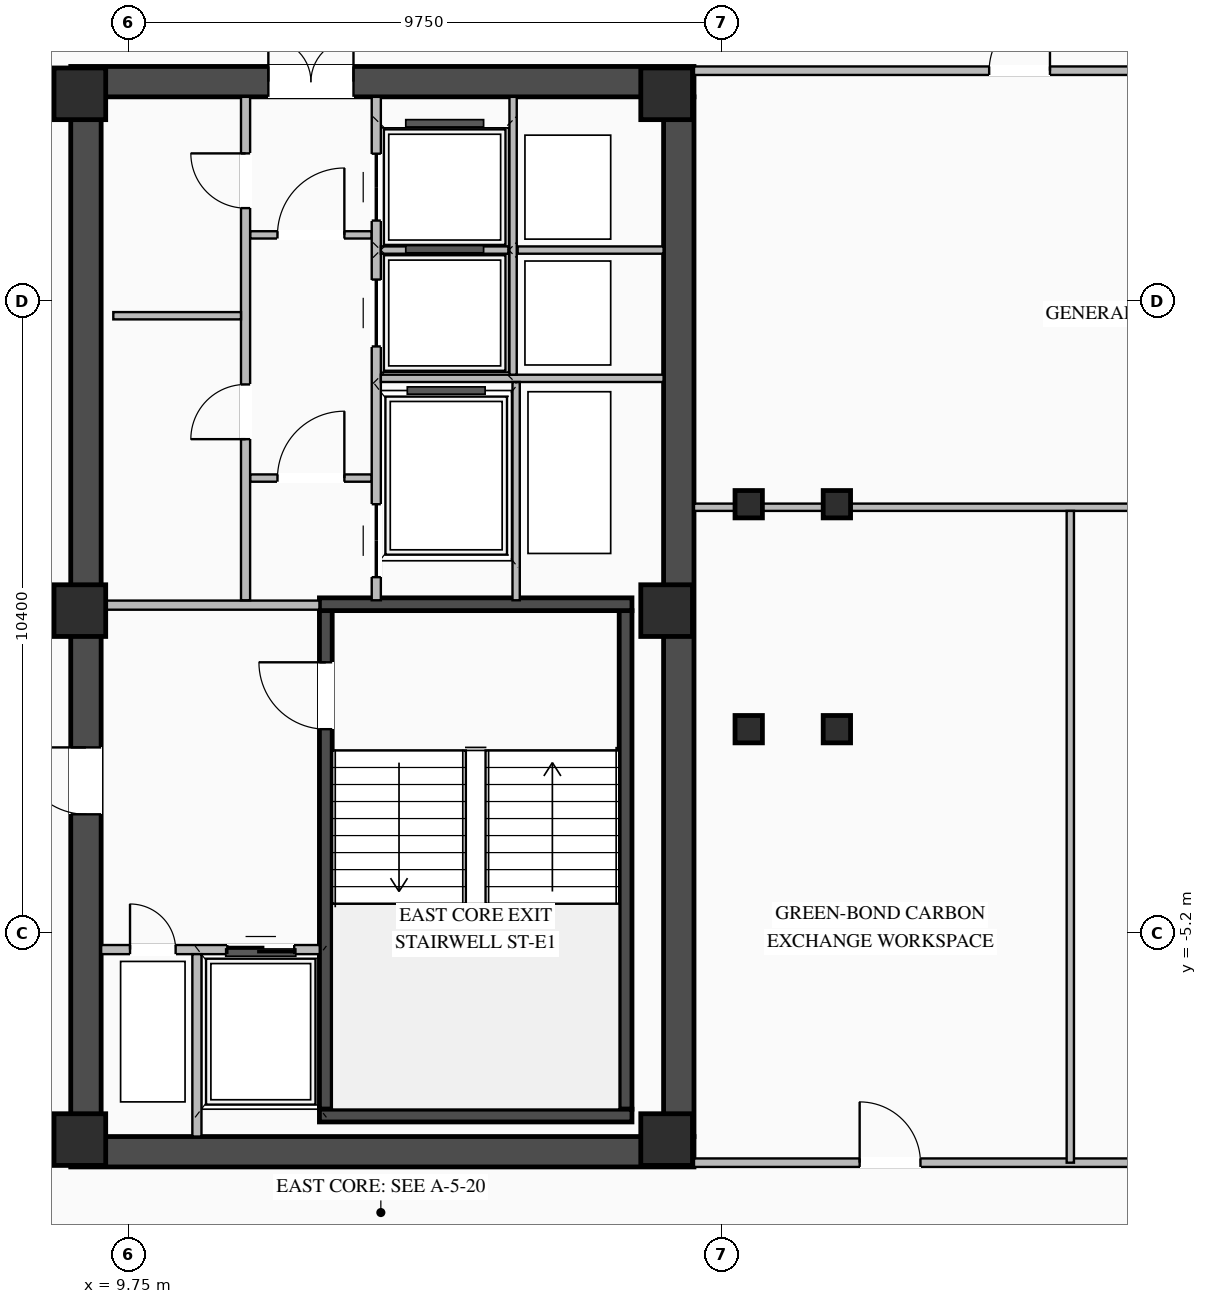
"""IFC4 building model, lengths in metres.
Left out: names, types, materials, properties, quantities, classifications, styles, units other than length and angle.
Written with IfcOpenShell. Run it as: python <this file> out.ifc"""

import sys

from ifc_helpers import new_model, si_unit, direction, frame, frame_2d, origin, origin_2d, place, context, subcontext, project, spatial, rectangle, i_section, extrude, element, fill, save


model = new_model("IFC4")
c1 = context("Model", 3, precision=1e-05, world=origin(), true_north=direction((0.0, 1.0)))
c2 = subcontext(c1, "Body", "Model", "MODEL_VIEW")
j1 = project(units=[si_unit("LENGTHUNIT", "METRE"), si_unit("PLANEANGLEUNIT", "RADIAN")], contexts=[c1])
p1 = place(None, origin())
s1 = spatial("IfcSite", under=j1, at=p1, CompositionType="ELEMENT")
p2 = place(p1, origin())
s2 = spatial("IfcBuilding", under=s1, at=p2, CompositionType="ELEMENT")
p3 = place(p2, frame((0.0, 0.0, 272.4)))
s3 = spatial("IfcBuildingStorey", under=s2, at=p3, CompositionType="ELEMENT", Elevation=272.4)
p4 = place(p3, frame((8.8, -8.8, 0.0), z_axis=(0.0, 0.0, 1.0), x_axis=(1.0, 0.0, 0.0)))
e1 = element("IfcWall", 1, at=p4, inside=s3, PredefinedType="SHEAR", context=c2, shape_type="SweptSolid", body=[
    extrude(rectangle(XDim=10.25, YDim=0.5, at=frame_2d((5.125, 0.0))), origin(), (0.0, 0.0, 1.0), 3.27),
])
p5 = place(p3, frame((8.8, 8.8, 0.0), z_axis=(0.0, 0.0, 1.0), x_axis=(1.0, 0.0, 0.0)))
e2 = element("IfcWall", 2, at=p5, inside=s3, PredefinedType="SHEAR", context=c2, shape_type="SweptSolid", body=[
    extrude(rectangle(XDim=10.25, YDim=0.5, at=frame_2d((5.125, 0.0))), origin(), (0.0, 0.0, 1.0), 3.27),
])
p6 = place(p5, frame((3.25, 0.0, 0.0)))
e3 = element("IfcOpeningElement", 3, at=p6, cuts=e2, PredefinedType="OPENING", context=c2, shape_type="SweptSolid", body=[
    extrude(rectangle(XDim=1.4, YDim=2.05, at=frame_2d((0.7, 1.025))), frame((0.0, 0.26, 0.0), z_axis=(0.0, -1.0, 0.0), x_axis=(1.0, 0.0, 0.0)), (0.0, 0.0, 1.0), 0.52),
])
p7 = place(p3, frame((9.05, -8.55, 0.0), z_axis=(0.0, 0.0, 1.0), x_axis=(0.0, 1.0, 0.0)))
e4 = element("IfcWall", 4, at=p7, inside=s3, PredefinedType="SHEAR", context=c2, shape_type="SweptSolid", body=[
    extrude(rectangle(XDim=17.1, YDim=0.5, at=frame_2d((8.55, 0.0))), origin(), (0.0, 0.0, 1.0), 3.27),
])
p8 = place(p7, frame((5.3, 0.0, 0.0)))
e5 = element("IfcOpeningElement", 5, at=p8, cuts=e4, PredefinedType="OPENING", context=c2, shape_type="SweptSolid", body=[
    extrude(rectangle(XDim=1.1, YDim=2.08, at=frame_2d((0.55, 1.04))), frame((0.0, 0.26, 0.0), z_axis=(0.0, -1.0, 0.0), x_axis=(1.0, 0.0, 0.0)), (0.0, 0.0, 1.0), 0.52),
])
p9 = place(p3, frame((18.8, -8.55, 0.0), z_axis=(0.0, 0.0, 1.0), x_axis=(0.0, 1.0, 0.0)))
e6 = element("IfcWall", 6, at=p9, inside=s3, PredefinedType="SHEAR", context=c2, shape_type="SweptSolid", body=[
    extrude(rectangle(XDim=17.1, YDim=0.5, at=frame_2d((8.55, 0.0))), origin(), (0.0, 0.0, 1.0), 3.27),
])
p10 = place(p3, frame((12.995, -8.1, 0.0), z_axis=(0.0, 0.0, 1.0), x_axis=(0.0, 1.0, 0.0)))
e7 = element("IfcWall", 7, at=p10, inside=s3, PredefinedType="SHEAR", context=c2, shape_type="SweptSolid", body=[
    extrude(rectangle(XDim=8.2, YDim=0.21, at=frame_2d((4.1, 0.0))), origin(), (0.0, 0.0, 1.0), 3.27),
])
p11 = place(p10, frame((6.25, 0.0, 0.0)))
e8 = element("IfcOpeningElement", 8, at=p11, cuts=e7, PredefinedType="OPENING", context=c2, shape_type="SweptSolid", body=[
    extrude(rectangle(XDim=1.1, YDim=2.15, at=frame_2d((0.55, 1.075))), frame((0.0, 0.115, 0.0), z_axis=(0.0, -1.0, 0.0), x_axis=(1.0, 0.0, 0.0)), (0.0, 0.0, 1.0), 0.23),
])
p12 = place(p3, frame((17.925, -8.1, 0.0), z_axis=(0.0, 0.0, 1.0), x_axis=(0.0, 1.0, 0.0)))
e9 = element("IfcWall", 9, at=p12, inside=s3, PredefinedType="SHEAR", context=c2, shape_type="SweptSolid", body=[
    extrude(rectangle(XDim=8.2, YDim=0.21, at=frame_2d((4.1, 0.0))), origin(), (0.0, 0.0, 1.0), 3.27),
])
for number, where, z_axis, x_axis in (
    (10, (12.89, -8.205, 0.0), (0.0, 0.0, 1.0), (1.0, 0.0, 0.0)),
    (11, (18.03, 0.205, 0.0), (0.0, 0.0, 1.0), (-1.0, 0.0, 0.0)),
):
    element("IfcWall", number, at=place(p3, frame(where, z_axis=z_axis, x_axis=x_axis)), inside=s3, PredefinedType="SHEAR", context=c2, shape_type="SweptSolid", body=[
        extrude(rectangle(XDim=5.14, YDim=0.21, at=frame_2d((2.57, 0.0))), origin(), (0.0, 0.0, 1.0), 3.27),
    ])
for number, where, z_axis, x_axis in (
    (12, (8.95, -8.6, 0.0), (0.0, 0.0, 1.0), (1.0, 0.0, 0.0)),
    (13, (8.95, 0.1, 0.0), (0.0, 0.0, 1.0), (1.0, 0.0, 0.0)),
    (14, (8.95, 8.6, 0.0), (0.0, 0.0, 1.0), (1.0, 0.0, 0.0)),
    (15, (18.6, -8.6, 0.0), (0.0, 0.0, 1.0), (1.0, 0.0, 0.0)),
    (16, (18.6, 0.1, 0.0), (0.0, 0.0, 1.0), (1.0, 0.0, 0.0)),
    (17, (18.6, 8.6, 0.0), (0.0, 0.0, 1.0), (1.0, 0.0, 0.0)),
):
    element("IfcColumn", number, at=place(p3, frame(where, z_axis=z_axis, x_axis=x_axis)), inside=s3, PredefinedType="COLUMN", context=c2, shape_type="SweptSolid", body=[
        extrude(rectangle(XDim=0.85, YDim=0.85, at=origin_2d()), origin(), (0.0, 0.0, 1.0), 3.45),
    ])
for number, where, z_axis, x_axis in (
    (18, (19.95, -1.85, 0.0), (0.0, 0.0, 1.0), (1.0, 0.0, 0.0)),
    (19, (19.95, 1.85, 0.0), (0.0, 0.0, 1.0), (1.0, 0.0, 0.0)),
    (20, (21.4, -1.85, 0.0), (0.0, 0.0, 1.0), (1.0, 0.0, 0.0)),
    (21, (21.4, 1.85, 0.0), (0.0, 0.0, 1.0), (1.0, 0.0, 0.0)),
):
    element("IfcColumn", number, at=place(p3, frame(where, z_axis=z_axis, x_axis=x_axis)), inside=s3, PredefinedType="COLUMN", context=c2, shape_type="SweptSolid", body=[
        extrude(i_section(OverallWidth=0.45, OverallDepth=0.45, WebThickness=0.022, FlangeThickness=0.032, at=origin_2d()), origin(), (0.0, 0.0, 1.0), 3.45),
    ])
p13 = place(p3, frame((9.3, -5.475, 0.0), z_axis=(0.0, 0.0, 1.0), x_axis=(1.0, 0.0, 0.0)))
e22 = element("IfcWall", 22, at=p13, inside=s3, PredefinedType="STANDARD", context=c2, shape_type="SweptSolid", body=[
    extrude(rectangle(XDim=3.595, YDim=0.15, at=frame_2d((1.797, 0.0))), origin(), (0.0, 0.0, 1.0), 3.25),
])
p14 = place(p13, frame((2.075, 0.0, 0.0)))
e23 = element("IfcOpeningElement", 23, at=p14, cuts=e22, PredefinedType="OPENING", context=c2, shape_type="SweptSolid", body=[
    extrude(rectangle(XDim=1.1, YDim=2.15, at=frame_2d((0.55, 1.075))), frame((0.0, 0.085, 0.0), z_axis=(0.0, -1.0, 0.0), x_axis=(1.0, 0.0, 0.0)), (0.0, 0.0, 1.0), 0.17),
])
p15 = place(p13, frame((0.475, 0.0, 0.0)))
e24 = element("IfcOpeningElement", 24, at=p15, cuts=e22, PredefinedType="OPENING", context=c2, shape_type="SweptSolid", body=[
    extrude(rectangle(XDim=0.75, YDim=2.05, at=frame_2d((0.375, 1.025))), frame((0.0, 0.085, 0.0), z_axis=(0.0, -1.0, 0.0), x_axis=(1.0, 0.0, 0.0)), (0.0, 0.0, 1.0), 0.17),
])
p16 = place(p3, frame((10.875, -8.55, 0.0), z_axis=(0.0, 0.0, 1.0), x_axis=(0.0, 1.0, 0.0)))
e25 = element("IfcWall", 25, at=p16, inside=s3, PredefinedType="STANDARD", context=c2, shape_type="SweptSolid", body=[
    extrude(rectangle(XDim=3.0, YDim=0.15, at=frame_2d((1.5, 0.0))), origin(), (0.0, 0.0, 1.0), 3.25),
])
p17 = place(p3, frame((9.3, 0.19, 0.0), z_axis=(0.0, 0.0, 1.0), x_axis=(1.0, 0.0, 0.0)))
e26 = element("IfcWall", 26, at=p17, inside=s3, PredefinedType="STANDARD", context=c2, shape_type="SweptSolid", body=[
    extrude(rectangle(XDim=3.59, YDim=0.15, at=frame_2d((1.795, 0.0))), origin(), (0.0, 0.0, 1.0), 2.645),
])
p18 = place(p3, frame((11.75, 2.28, 0.0), z_axis=(0.0, 0.0, 1.0), x_axis=(1.0, 0.0, 0.0)))
e27 = element("IfcWall", 27, at=p18, inside=s3, PredefinedType="STANDARD", context=c2, shape_type="SweptSolid", body=[
    extrude(rectangle(XDim=2.0, YDim=0.12, at=frame_2d((1.0, 0.0))), origin(), (0.0, 0.0, 1.0), 3.25),
])
p19 = place(p18, frame((0.45, 0.0, 0.0)))
e28 = element("IfcOpeningElement", 28, at=p19, cuts=e27, PredefinedType="OPENING", context=c2, shape_type="SweptSolid", body=[
    extrude(rectangle(XDim=1.1, YDim=2.1, at=frame_2d((0.55, 1.05))), frame((0.0, 0.07, 0.0), z_axis=(0.0, -1.0, 0.0), x_axis=(1.0, 0.0, 0.0)), (0.0, 0.0, 1.0), 0.14),
])
p20 = place(p3, frame((11.75, 6.28, 0.0), z_axis=(0.0, 0.0, 1.0), x_axis=(1.0, 0.0, 0.0)))
e29 = element("IfcWall", 29, at=p20, inside=s3, PredefinedType="STANDARD", context=c2, shape_type="SweptSolid", body=[
    extrude(rectangle(XDim=2.0, YDim=0.12, at=frame_2d((1.0, 0.0))), origin(), (0.0, 0.0, 1.0), 3.25),
])
p21 = place(p20, frame((0.45, 0.0, 0.0)))
e30 = element("IfcOpeningElement", 30, at=p21, cuts=e29, PredefinedType="OPENING", context=c2, shape_type="SweptSolid", body=[
    extrude(rectangle(XDim=1.1, YDim=2.1, at=frame_2d((0.55, 1.05))), frame((0.0, 0.07, 0.0), z_axis=(0.0, -1.0, 0.0), x_axis=(1.0, 0.0, 0.0)), (0.0, 0.0, 1.0), 0.14),
])
p22 = place(p3, frame((11.675, 0.27, 0.0), z_axis=(0.0, 0.0, 1.0), x_axis=(0.0, 1.0, 0.0)))
e31 = element("IfcWall", 31, at=p22, inside=s3, PredefinedType="STANDARD", context=c2, shape_type="SweptSolid", body=[
    extrude(rectangle(XDim=8.28, YDim=0.15, at=frame_2d((4.14, 0.0))), origin(), (0.0, 0.0, 1.0), 3.25),
])
p23 = place(p22, frame((2.65, 0.0, 0.0)))
e32 = element("IfcOpeningElement", 32, at=p23, cuts=e31, PredefinedType="OPENING", context=c2, shape_type="SweptSolid", body=[
    extrude(rectangle(XDim=0.9, YDim=2.05, at=frame_2d((0.45, 1.025))), frame((0.0, 0.085, 0.0), z_axis=(0.0, -1.0, 0.0), x_axis=(1.0, 0.0, 0.0)), (0.0, 0.0, 1.0), 0.17),
])
p24 = place(p22, frame((6.45, 0.0, 0.0)))
e33 = element("IfcOpeningElement", 33, at=p24, cuts=e31, PredefinedType="OPENING", context=c2, shape_type="SweptSolid", body=[
    extrude(rectangle(XDim=0.9, YDim=2.05, at=frame_2d((0.45, 1.025))), frame((0.0, 0.085, 0.0), z_axis=(0.0, -1.0, 0.0), x_axis=(1.0, 0.0, 0.0)), (0.0, 0.0, 1.0), 0.17),
])
p25 = place(p3, frame((9.5, 4.95, 0.0), z_axis=(0.0, 0.0, 1.0), x_axis=(1.0, 0.0, 0.0)))
e34 = element("IfcWall", 34, at=p25, inside=s3, PredefinedType="STANDARD", context=c2, shape_type="SweptSolid", body=[
    extrude(rectangle(XDim=2.1, YDim=0.12, at=frame_2d((1.05, 0.0))), origin(), (0.0, 0.0, 1.0), 3.25),
])
p26 = place(p3, frame((13.825, 0.27, 0.0), z_axis=(0.0, 0.0, 1.0), x_axis=(0.0, 1.0, 0.0)))
e35 = element("IfcWall", 35, at=p26, inside=s3, PredefinedType="STANDARD", context=c2, shape_type="SweptSolid", body=[
    extrude(rectangle(XDim=8.28, YDim=0.15, at=frame_2d((4.14, 0.0))), origin(), (0.0, 0.0, 1.0), 3.25),
])
p27 = place(p26, frame((4.175, 0.0, 0.0)))
e36 = element("IfcOpeningElement", 36, at=p27, cuts=e35, PredefinedType="OPENING", context=c2, shape_type="SweptSolid", body=[
    extrude(rectangle(XDim=1.1, YDim=2.1, at=frame_2d((0.55, 1.05))), frame((0.0, 0.085, 0.0), z_axis=(0.0, -1.0, 0.0), x_axis=(1.0, 0.0, 0.0)), (0.0, 0.0, 1.0), 0.17),
])
p28 = place(p26, frame((6.245, 0.0, 0.0)))
e37 = element("IfcOpeningElement", 37, at=p28, cuts=e35, PredefinedType="OPENING", context=c2, shape_type="SweptSolid", body=[
    extrude(rectangle(XDim=1.1, YDim=2.1, at=frame_2d((0.55, 1.05))), frame((0.0, 0.085, 0.0), z_axis=(0.0, -1.0, 0.0), x_axis=(1.0, 0.0, 0.0)), (0.0, 0.0, 1.0), 0.17),
])
p29 = place(p26, frame((0.38, 0.0, 0.0)))
e38 = element("IfcOpeningElement", 38, at=p29, cuts=e35, PredefinedType="OPENING", context=c2, shape_type="SweptSolid", body=[
    extrude(rectangle(XDim=1.2, YDim=2.1, at=frame_2d((0.6, 1.05))), frame((0.0, 0.085, 0.0), z_axis=(0.0, -1.0, 0.0), x_axis=(1.0, 0.0, 0.0)), (0.0, 0.0, 1.0), 0.17),
])
p30 = place(p3, frame((13.9, 3.92, 0.0), z_axis=(0.0, 0.0, 1.0), x_axis=(1.0, 0.0, 0.0)))
e39 = element("IfcWall", 39, at=p30, inside=s3, PredefinedType="STANDARD", context=c2, shape_type="SweptSolid", body=[
    extrude(rectangle(XDim=4.65, YDim=0.12, at=frame_2d((2.325, 0.0))), origin(), (0.0, 0.0, 1.0), 3.25),
])
p31 = place(p3, frame((16.15, 6.03, 0.0), z_axis=(0.0, 0.0, 1.0), x_axis=(1.0, 0.0, 0.0)))
e40 = element("IfcWall", 40, at=p31, inside=s3, PredefinedType="STANDARD", context=c2, shape_type="SweptSolid", body=[
    extrude(rectangle(XDim=2.4, YDim=0.12, at=frame_2d((1.2, 0.0))), origin(), (0.0, 0.0, 1.0), 3.25),
])
p32 = place(p3, frame((16.075, 3.98, 0.0), z_axis=(0.0, 0.0, 1.0), x_axis=(0.0, 1.0, 0.0)))
e41 = element("IfcWall", 41, at=p32, inside=s3, PredefinedType="STANDARD", context=c2, shape_type="SweptSolid", body=[
    extrude(rectangle(XDim=4.57, YDim=0.12, at=frame_2d((2.285, 0.0))), origin(), (0.0, 0.0, 1.0), 3.25),
])
p33 = place(p3, frame((13.9, 6.03, 0.0), z_axis=(0.0, 0.0, 1.0), x_axis=(1.0, 0.0, 0.0)))
e42 = element("IfcWall", 42, at=p33, inside=s3, PredefinedType="STANDARD", context=c2, shape_type="SweptSolid", body=[
    extrude(rectangle(XDim=2.1, YDim=0.12, at=frame_2d((1.05, 0.0))), origin(), (0.0, 0.0, 1.0), 3.25),
])
p34 = place(p3, frame((16.125, 0.27, 0.0), z_axis=(0.0, 0.0, 1.0), x_axis=(0.0, 1.0, 0.0)))
e43 = element("IfcWall", 43, at=p34, inside=s3, PredefinedType="STANDARD", context=c2, shape_type="SweptSolid", body=[
    extrude(rectangle(XDim=3.59, YDim=0.12, at=frame_2d((1.795, 0.0))), origin(), (0.0, 0.0, 1.0), 3.25),
])
p35 = place(p3, frame((19.05, 8.98, 0.0), z_axis=(0.0, 0.0, 1.0), x_axis=(1.0, 0.0, 0.0)))
e44 = element("IfcWall", 44, at=p35, inside=s3, PredefinedType="STANDARD", context=c2, shape_type="SweptSolid", body=[
    extrude(rectangle(XDim=10.709, YDim=0.14, at=frame_2d((5.354, 0.0))), origin(), (0.0, 0.0, 1.0), 3.25),
])
p36 = place(p35, frame((4.854, 0.0, 0.0)))
e45 = element("IfcOpeningElement", 45, at=p36, cuts=e44, PredefinedType="OPENING", context=c2, shape_type="SweptSolid", body=[
    extrude(rectangle(XDim=1.0, YDim=2.08, at=frame_2d((0.5, 1.04))), frame((0.0, 0.08, 0.0), z_axis=(0.0, -1.0, 0.0), x_axis=(1.0, 0.0, 0.0)), (0.0, 0.0, 1.0), 0.16),
])
p37 = place(p3, frame((19.05, -8.98, 0.0), z_axis=(0.0, 0.0, 1.0), x_axis=(1.0, 0.0, 0.0)))
e46 = element("IfcWall", 46, at=p37, inside=s3, PredefinedType="STANDARD", context=c2, shape_type="SweptSolid", body=[
    extrude(rectangle(XDim=12.438, YDim=0.14, at=frame_2d((6.219, 0.0))), origin(), (0.0, 0.0, 1.0), 3.25),
])
p38 = place(p37, frame((2.725, 0.0, 0.0)))
e47 = element("IfcOpeningElement", 47, at=p38, cuts=e46, PredefinedType="OPENING", context=c2, shape_type="SweptSolid", body=[
    extrude(rectangle(XDim=1.0, YDim=2.08, at=frame_2d((0.5, 1.04))), frame((0.0, 0.08, 0.0), z_axis=(0.0, -1.0, 0.0), x_axis=(1.0, 0.0, 0.0)), (0.0, 0.0, 1.0), 0.16),
])
p39 = place(p37, frame((8.684, 0.0, 0.0)))
e48 = element("IfcOpeningElement", 48, at=p39, cuts=e46, PredefinedType="OPENING", context=c2, shape_type="SweptSolid", body=[
    extrude(rectangle(XDim=1.0, YDim=2.08, at=frame_2d((0.5, 1.04))), frame((0.0, 0.08, 0.0), z_axis=(0.0, -1.0, 0.0), x_axis=(1.0, 0.0, 0.0)), (0.0, 0.0, 1.0), 0.16),
])
p40 = place(p3, frame((19.05, 1.8, 0.0), z_axis=(0.0, 0.0, 1.0), x_axis=(1.0, 0.0, 0.0)))
e49 = element("IfcWall", 49, at=p40, inside=s3, PredefinedType="STANDARD", context=c2, shape_type="SweptSolid", body=[
    extrude(rectangle(XDim=11.4, YDim=0.12, at=frame_2d((5.7, 0.0))), origin(), (0.0, 0.0, 1.0), 3.25),
])
p41 = place(p3, frame((25.239, -8.98, 0.0), z_axis=(0.0, 0.0, 1.0), x_axis=(0.0, 1.0, 0.0)))
e50 = element("IfcWall", 50, at=p41, inside=s3, PredefinedType="STANDARD", context=c2, shape_type="SweptSolid", body=[
    extrude(rectangle(XDim=10.72, YDim=0.12, at=frame_2d((5.36, 0.0))), origin(), (0.0, 0.0, 1.0), 3.25),
])
p42 = place(p11, origin())
e51 = element("IfcDoor", 51, at=p42, inside=s3, OperationType="SINGLE_SWING_RIGHT", PredefinedType="DOOR", context=c2, shape_type="SweptSolid", body=[
    extrude(rectangle(XDim=1.1, YDim=2.15, at=frame_2d((0.55, 1.075))), frame((0.0, 0.025, 0.0), z_axis=(0.0, -1.0, 0.0), x_axis=(1.0, 0.0, 0.0)), (0.0, 0.0, 1.0), 0.05),
])
fill(e8, e51)
p43 = place(p14, origin())
e52 = element("IfcDoor", 52, at=p43, inside=s3, OperationType="DOUBLE_DOOR_SLIDING", PredefinedType="DOOR", context=c2, shape_type="SweptSolid", body=[
    extrude(rectangle(XDim=1.1, YDim=2.15, at=frame_2d((0.55, 1.075))), frame((0.0, 0.025, 0.0), z_axis=(0.0, -1.0, 0.0), x_axis=(1.0, 0.0, 0.0)), (0.0, 0.0, 1.0), 0.05),
])
fill(e23, e52)
p44 = place(p15, origin())
e53 = element("IfcDoor", 53, at=p44, inside=s3, OperationType="SINGLE_SWING_LEFT", PredefinedType="DOOR", context=c2, shape_type="SweptSolid", body=[
    extrude(rectangle(XDim=0.75, YDim=2.05, at=frame_2d((0.375, 1.025))), frame((0.0, 0.025, 0.0), z_axis=(0.0, -1.0, 0.0), x_axis=(1.0, 0.0, 0.0)), (0.0, 0.0, 1.0), 0.05),
])
fill(e24, e53)
p45 = place(p8, origin())
e54 = element("IfcDoor", 54, at=p45, inside=s3, OperationType="SINGLE_SWING_RIGHT", PredefinedType="DOOR", context=c2, shape_type="SweptSolid", body=[
    extrude(rectangle(XDim=1.1, YDim=2.08, at=frame_2d((0.55, 1.04))), frame((0.0, -0.155, 0.0), z_axis=(0.0, -1.0, 0.0), x_axis=(1.0, 0.0, 0.0)), (0.0, 0.0, 1.0), 0.05),
])
fill(e5, e54)
p46 = place(p19, origin())
e55 = element("IfcDoor", 55, at=p46, inside=s3, OperationType="SINGLE_SWING_RIGHT", PredefinedType="DOOR", context=c2, shape_type="SweptSolid", body=[
    extrude(rectangle(XDim=1.1, YDim=2.1, at=frame_2d((0.55, 1.05))), frame((0.0, 0.025, 0.0), z_axis=(0.0, -1.0, 0.0), x_axis=(1.0, 0.0, 0.0)), (0.0, 0.0, 1.0), 0.05),
])
fill(e28, e55)
p47 = place(p21, origin())
e56 = element("IfcDoor", 56, at=p47, inside=s3, OperationType="SINGLE_SWING_RIGHT", PredefinedType="DOOR", context=c2, shape_type="SweptSolid", body=[
    extrude(rectangle(XDim=1.1, YDim=2.1, at=frame_2d((0.55, 1.05))), frame((0.0, 0.025, 0.0), z_axis=(0.0, -1.0, 0.0), x_axis=(1.0, 0.0, 0.0)), (0.0, 0.0, 1.0), 0.05),
])
fill(e30, e56)
p48 = place(p6, origin())
e57 = element("IfcDoor", 57, at=p48, inside=s3, OperationType="DOUBLE_DOOR_SINGLE_SWING", PredefinedType="DOOR", context=c2, shape_type="SweptSolid", body=[
    extrude(rectangle(XDim=1.4, YDim=2.05, at=frame_2d((0.7, 1.025))), frame((0.0, 0.195, 0.0), z_axis=(0.0, -1.0, 0.0), x_axis=(1.0, 0.0, 0.0)), (0.0, 0.0, 1.0), 0.05),
])
fill(e3, e57)
p49 = place(p23, origin())
e58 = element("IfcDoor", 58, at=p49, inside=s3, OperationType="SINGLE_SWING_LEFT", PredefinedType="DOOR", context=c2, shape_type="SweptSolid", body=[
    extrude(rectangle(XDim=0.9, YDim=2.05, at=frame_2d((0.45, 1.025))), frame((0.0, 0.025, 0.0), z_axis=(0.0, -1.0, 0.0), x_axis=(1.0, 0.0, 0.0)), (0.0, 0.0, 1.0), 0.05),
])
fill(e32, e58)
p50 = place(p24, origin())
e59 = element("IfcDoor", 59, at=p50, inside=s3, OperationType="SINGLE_SWING_RIGHT", PredefinedType="DOOR", context=c2, shape_type="SweptSolid", body=[
    extrude(rectangle(XDim=0.9, YDim=2.05, at=frame_2d((0.45, 1.025))), frame((0.0, 0.025, 0.0), z_axis=(0.0, -1.0, 0.0), x_axis=(1.0, 0.0, 0.0)), (0.0, 0.0, 1.0), 0.05),
])
fill(e33, e59)
p51 = place(p27, origin())
e60 = element("IfcDoor", 60, at=p51, inside=s3, OperationType="DOUBLE_DOOR_SLIDING", PredefinedType="DOOR", context=c2, shape_type="SweptSolid", body=[
    extrude(rectangle(XDim=1.1, YDim=2.1, at=frame_2d((0.55, 1.05))), frame((0.0, 0.025, 0.0), z_axis=(0.0, -1.0, 0.0), x_axis=(1.0, 0.0, 0.0)), (0.0, 0.0, 1.0), 0.05),
])
fill(e36, e60)
p52 = place(p28, origin())
e61 = element("IfcDoor", 61, at=p52, inside=s3, OperationType="DOUBLE_DOOR_SLIDING", PredefinedType="DOOR", context=c2, shape_type="SweptSolid", body=[
    extrude(rectangle(XDim=1.1, YDim=2.1, at=frame_2d((0.55, 1.05))), frame((0.0, 0.025, 0.0), z_axis=(0.0, -1.0, 0.0), x_axis=(1.0, 0.0, 0.0)), (0.0, 0.0, 1.0), 0.05),
])
fill(e37, e61)
p53 = place(p29, origin())
e62 = element("IfcDoor", 62, at=p53, inside=s3, OperationType="DOUBLE_DOOR_SLIDING", PredefinedType="DOOR", context=c2, shape_type="SweptSolid", body=[
    extrude(rectangle(XDim=1.2, YDim=2.1, at=frame_2d((0.6, 1.05))), frame((0.0, 0.025, 0.0), z_axis=(0.0, -1.0, 0.0), x_axis=(1.0, 0.0, 0.0)), (0.0, 0.0, 1.0), 0.05),
])
fill(e38, e62)
p54 = place(p36, origin())
e63 = element("IfcDoor", 63, at=p54, inside=s3, OperationType="SINGLE_SWING_RIGHT", PredefinedType="DOOR", context=c2, shape_type="SweptSolid", body=[
    extrude(rectangle(XDim=1.0, YDim=2.08, at=frame_2d((0.5, 1.04))), frame((0.0, 0.025, 0.0), z_axis=(0.0, -1.0, 0.0), x_axis=(1.0, 0.0, 0.0)), (0.0, 0.0, 1.0), 0.05),
])
fill(e45, e63)
p55 = place(p38, origin())
e64 = element("IfcDoor", 64, at=p55, inside=s3, OperationType="SINGLE_SWING_LEFT", PredefinedType="DOOR", context=c2, shape_type="SweptSolid", body=[
    extrude(rectangle(XDim=1.0, YDim=2.08, at=frame_2d((0.5, 1.04))), frame((0.0, 0.025, 0.0), z_axis=(0.0, -1.0, 0.0), x_axis=(1.0, 0.0, 0.0)), (0.0, 0.0, 1.0), 0.05),
])
fill(e47, e64)
save(model, sys.argv[1])
